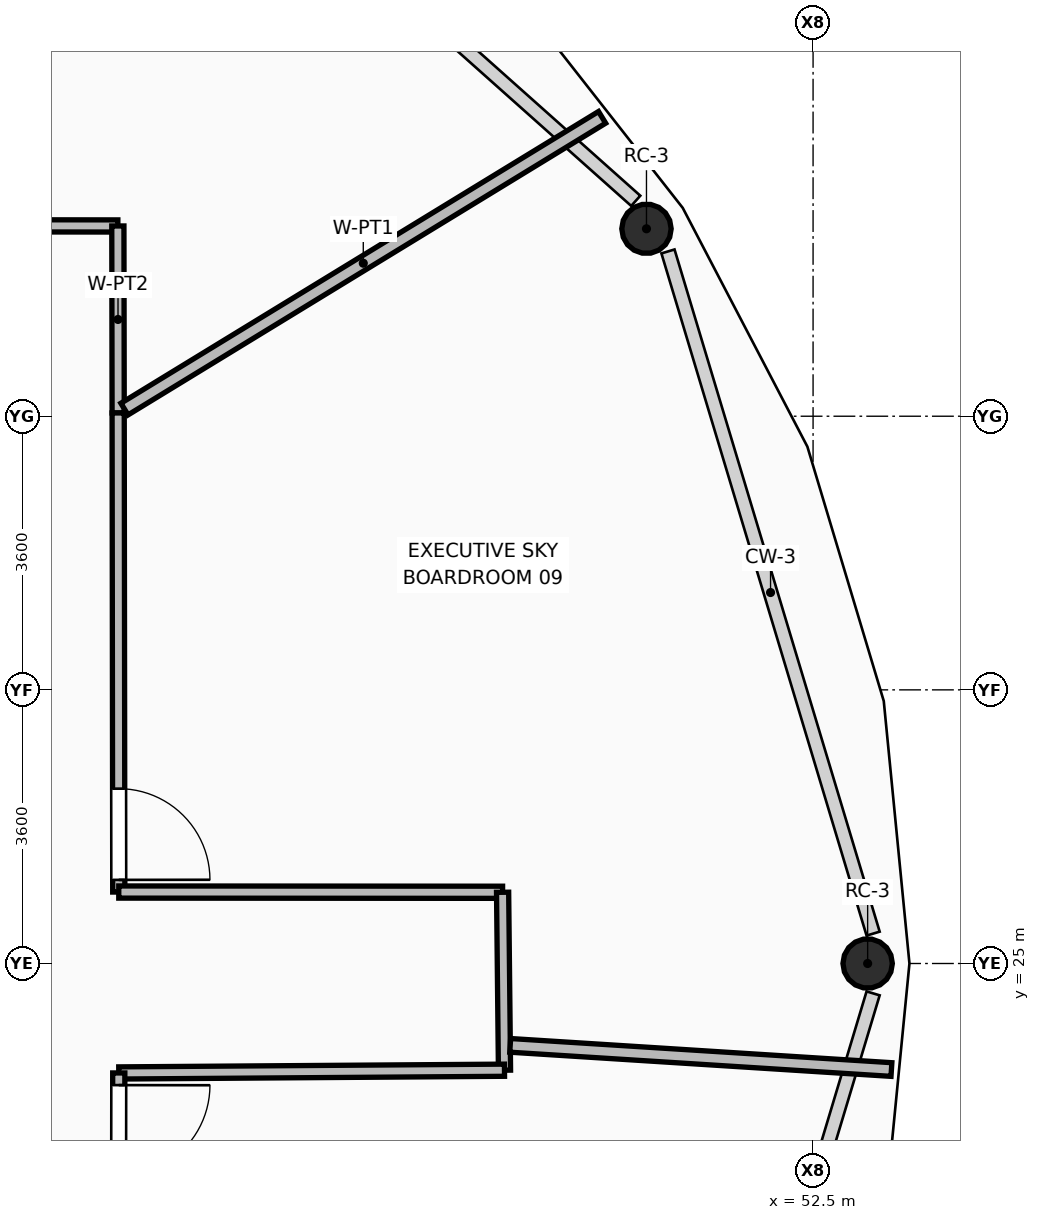
"""IFC4 building model, lengths in metres.
Left out: names, types, materials, properties, quantities, classifications, styles, units other than length and angle.
Written with IfcOpenShell. Run it as: python <this file> out.ifc"""

import sys

from ifc_helpers import new_model, si_unit, direction, frame, frame_2d, origin, origin_2d, place, context, subcontext, project, spatial, rectangle, hollow_circle, extrude, element, fill, save


model = new_model("IFC4")
c1 = context("Model", 3, precision=1e-05, world=origin(), true_north=direction((0.0, 1.0)))
c2 = subcontext(c1, "Body", "Model", "MODEL_VIEW")
j1 = project(units=[si_unit("LENGTHUNIT", "METRE"), si_unit("PLANEANGLEUNIT", "RADIAN")], contexts=[c1])
p1 = place(None, origin())
s1 = spatial("IfcSite", under=j1, at=p1, CompositionType="ELEMENT")
p2 = place(p1, origin())
s2 = spatial("IfcBuilding", under=s1, at=p2, CompositionType="ELEMENT")
p3 = place(p2, frame((0.0, 0.0, 246.15)))
s3 = spatial("IfcBuildingStorey", under=s2, at=p3, CompositionType="ELEMENT", Elevation=246.15)
for number, where, z_axis, x_axis in (
    (1, (53.218, 25.0, 0.0), (0.0, 0.0, 1.0), (1.0, 0.0, 0.0)),
    (2, (50.308, 34.666, 0.0), (0.0, 0.0, 1.0), (1.0, 0.0, 0.0)),
):
    element("IfcColumn", number, at=place(p3, frame(where, z_axis=z_axis, x_axis=x_axis)), inside=s3, PredefinedType="COLUMN", context=c2, shape_type="SweptSolid", body=[
        extrude(hollow_circle(Radius=0.325, WallThickness=0.03, at=origin_2d()), origin(), (0.0, 0.0, 1.0), 3.57),
    ])
p4 = place(p3, frame((32.74, 34.715, 0.0), z_axis=(0.0, 0.0, 1.0), x_axis=(0.99999933853, -0.001150191321, 0.0)))
e3 = element("IfcWall", 3, at=p4, inside=s3, PredefinedType="PARTITIONING", context=c2, shape_type="SweptSolid", body=[
    extrude(rectangle(XDim=10.613, YDim=0.16, at=frame_2d((5.307, 0.0))), origin(), (0.0, 0.0, 1.0), 3.081),
])
p5 = place(p4, frame((2.694, 0.0, 0.0)))
e4 = element("IfcOpeningElement", 4, at=p5, cuts=e3, PredefinedType="OPENING", context=c2, shape_type="SweptSolid", body=[
    extrude(rectangle(XDim=1.2, YDim=2.1, at=frame_2d((0.6, 1.05))), frame((0.0, 0.09, 0.0), z_axis=(0.0, -1.0, 0.0), x_axis=(1.0, 0.0, 0.0)), (0.0, 0.0, 1.0), 0.18),
])
p6 = place(p3, frame((43.353, 34.703, 0.0), z_axis=(0.0, 0.0, 1.0), x_axis=(0.001587929717, -0.999998739239, 0.0)))
e5 = element("IfcWall", 5, at=p6, inside=s3, PredefinedType="PARTITIONING", context=c2, shape_type="SweptSolid", body=[
    extrude(rectangle(XDim=2.46, YDim=0.16, at=frame_2d((1.23, 0.0))), origin(), (0.0, 0.0, 1.0), 3.081),
])
p7 = place(p3, frame((43.357, 32.243, 0.0), z_axis=(0.0, 0.0, 1.0), x_axis=(0.00127822648, -0.999999183068, 0.0)))
e6 = element("IfcWall", 6, at=p7, inside=s3, PredefinedType="PARTITIONING", context=c2, shape_type="SweptSolid", body=[
    extrude(rectangle(XDim=6.303, YDim=0.16, at=frame_2d((3.151, 0.0))), origin(), (0.0, 0.0, 1.0), 3.55),
])
p8 = place(p7, frame((4.943, 0.0, 0.0)))
e7 = element("IfcOpeningElement", 7, at=p8, cuts=e6, PredefinedType="OPENING", context=c2, shape_type="SweptSolid", body=[
    extrude(rectangle(XDim=1.2, YDim=2.1, at=frame_2d((0.6, 1.05))), frame((0.0, 0.09, 0.0), z_axis=(0.0, -1.0, 0.0), x_axis=(1.0, 0.0, 0.0)), (0.0, 0.0, 1.0), 0.18),
])
p9 = place(p3, frame((43.365, 25.94, 0.0), z_axis=(0.0, 0.0, 1.0), x_axis=(0.999999831724, -0.000580130432, 0.0)))
e8 = element("IfcWall", 8, at=p9, inside=s3, PredefinedType="PARTITIONING", context=c2, shape_type="SweptSolid", body=[
    extrude(rectangle(XDim=5.05, YDim=0.16, at=frame_2d((2.525, 0.0))), origin(), (0.0, 0.0, 1.0), 3.55),
])
p10 = place(p3, frame((48.415, 25.937, 0.0), z_axis=(0.0, 0.0, 1.0), x_axis=(0.010636586698, -0.999943429912, 0.0)))
e9 = element("IfcWall", 9, at=p10, inside=s3, PredefinedType="PARTITIONING", context=c2, shape_type="SweptSolid", body=[
    extrude(rectangle(XDim=2.341, YDim=0.16, at=frame_2d((1.171, 0.0))), origin(), (0.0, 0.0, 1.0), 3.55),
])
p11 = place(p3, frame((48.44, 23.596, 0.0), z_axis=(0.0, 0.0, 1.0), x_axis=(-0.999974996273, -0.007071550702, 0.0)))
e10 = element("IfcWall", 10, at=p11, inside=s3, PredefinedType="PARTITIONING", context=c2, shape_type="SweptSolid", body=[
    extrude(rectangle(XDim=5.075, YDim=0.16, at=frame_2d((2.538, 0.0))), origin(), (0.0, 0.0, 1.0), 3.55),
])
p12 = place(p3, frame((43.365, 23.56, 0.0), z_axis=(0.0, 0.0, 1.0), x_axis=(-0.001335548165, -0.999999108155, 0.0)))
e11 = element("IfcWall", 11, at=p12, inside=s3, PredefinedType="PARTITIONING", context=c2, shape_type="SweptSolid", body=[
    extrude(rectangle(XDim=8.226, YDim=0.16, at=frame_2d((4.113, 0.0))), origin(), (0.0, 0.0, 1.0), 3.081),
])
p13 = place(p12, frame((0.16, 0.0, 0.0)))
e12 = element("IfcOpeningElement", 12, at=p13, cuts=e11, PredefinedType="OPENING", context=c2, shape_type="SweptSolid", body=[
    extrude(rectangle(XDim=1.2, YDim=2.1, at=frame_2d((0.6, 1.05))), frame((0.0, 0.09, 0.0), z_axis=(0.0, -1.0, 0.0), x_axis=(1.0, 0.0, 0.0)), (0.0, 0.0, 1.0), 0.18),
])
p14 = place(p3, frame((43.44, 32.294, 0.0), z_axis=(0.0, 0.0, 1.0), x_axis=(0.853414575763, 0.521232732928, 0.0)))
e13 = element("IfcWall", 13, at=p14, inside=s3, PredefinedType="PARTITIONING", context=c2, shape_type="SweptSolid", body=[
    extrude(rectangle(XDim=7.364, YDim=0.18, at=frame_2d((3.682, 0.0))), origin(), (0.0, 0.0, 1.0), 2.925),
])
p15 = place(p3, frame((48.515, 23.923, 0.0), z_axis=(0.0, 0.0, 1.0), x_axis=(0.997995081833, -0.063291521057, 0.0)))
e14 = element("IfcWall", 14, at=p15, inside=s3, PredefinedType="PARTITIONING", context=c2, shape_type="SweptSolid", body=[
    extrude(rectangle(XDim=5.026, YDim=0.18, at=frame_2d((2.513, 0.0))), origin(), (0.0, 0.0, 1.0), 2.925),
])
p16 = place(p13, origin())
e15 = element("IfcDoor", 15, at=p16, inside=s3, OperationType="SINGLE_SWING_LEFT", PredefinedType="DOOR", context=c2, shape_type="SweptSolid", body=[
    extrude(rectangle(XDim=1.2, YDim=2.1, at=frame_2d((0.6, 1.05))), frame((0.0, 0.025, 0.0), z_axis=(0.0, -1.0, 0.0), x_axis=(1.0, 0.0, 0.0)), (0.0, 0.0, 1.0), 0.05),
])
fill(e12, e15)
p17 = place(p8, origin())
e16 = element("IfcDoor", 16, at=p17, inside=s3, OperationType="SINGLE_SWING_RIGHT", PredefinedType="DOOR", context=c2, shape_type="SweptSolid", body=[
    extrude(rectangle(XDim=1.2, YDim=2.1, at=frame_2d((0.6, 1.05))), frame((0.0, 0.025, 0.0), z_axis=(0.0, -1.0, 0.0), x_axis=(1.0, 0.0, 0.0)), (0.0, 0.0, 1.0), 0.05),
])
fill(e7, e16)
save(model, sys.argv[1])
